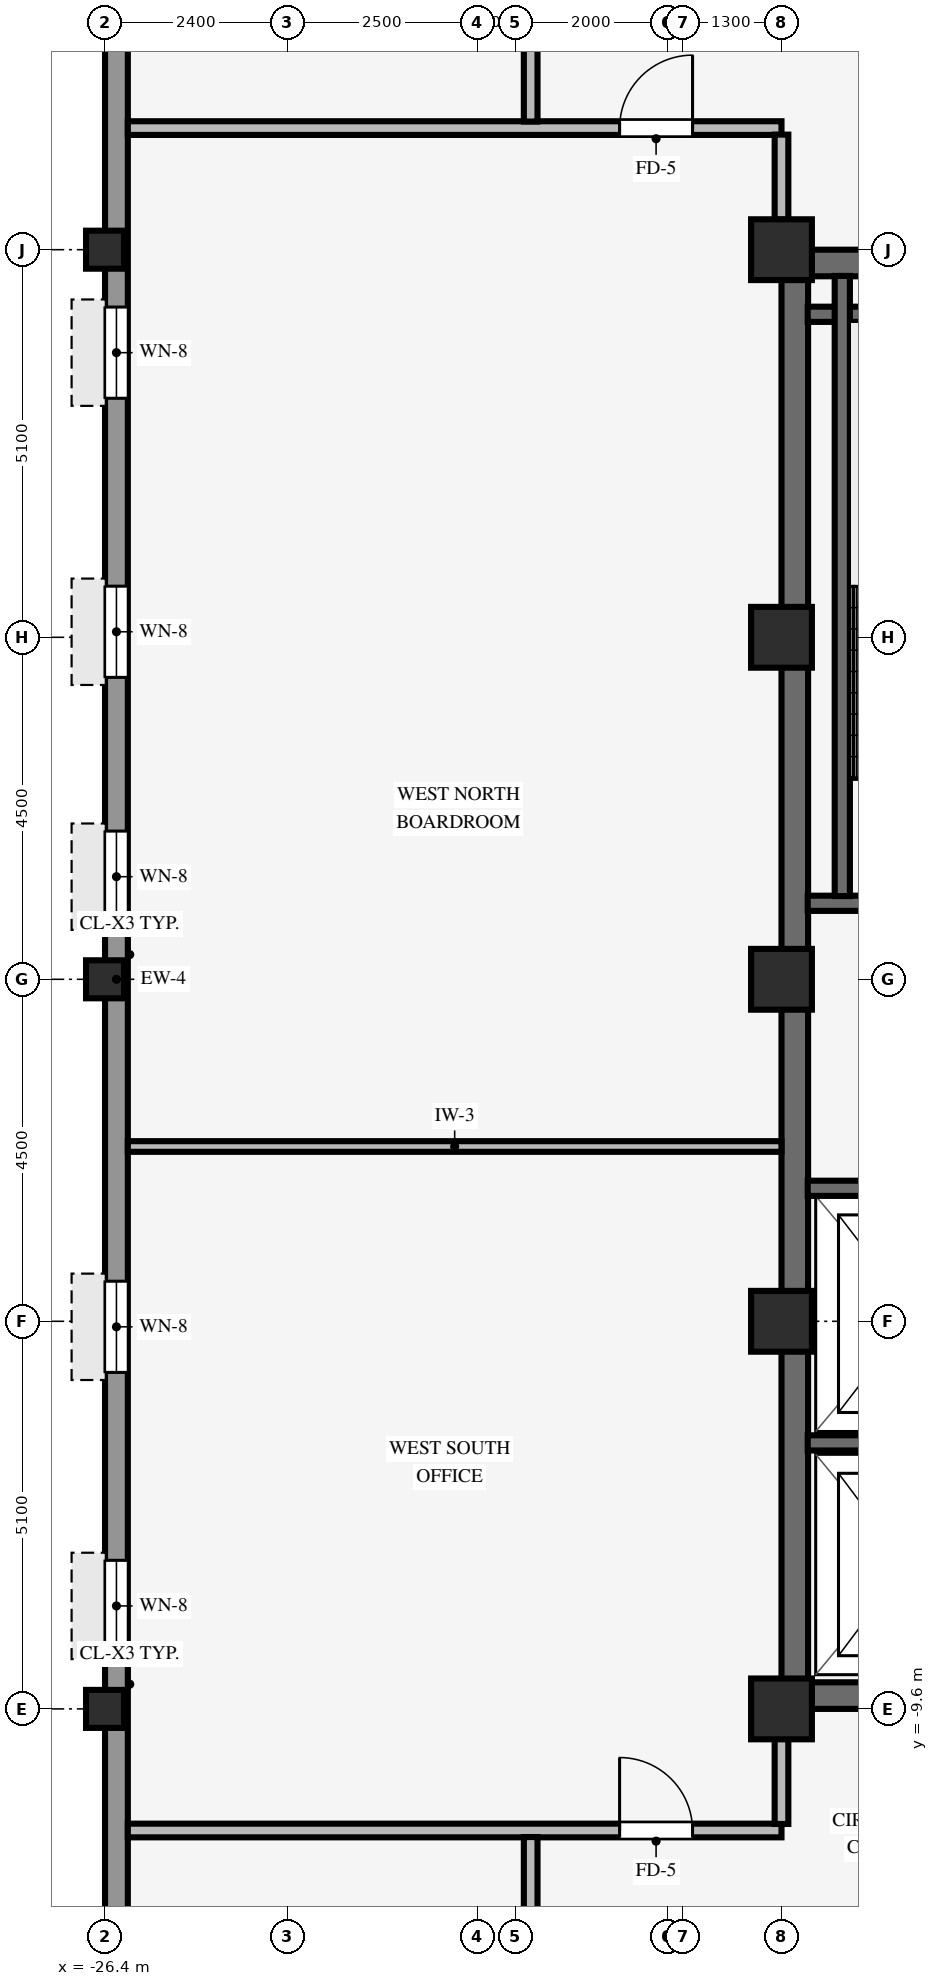
"""IFC4 building model, lengths in metres.
Left out: names, types, materials, properties, quantities, classifications, styles, units other than length and angle.
Written with IfcOpenShell. Run it as: python <this file> out.ifc"""

import sys

from ifc_helpers import new_model, si_unit, direction, frame, frame_2d, origin, origin_2d, place, context, subcontext, project, spatial, rectangle, hollow_rectangle, extrude, source, transform, mapped, element, fill, save


model = new_model("IFC4")
c1 = context("Model", 3, precision=1e-05, world=origin(), true_north=direction((0.0, 1.0)))
c2 = subcontext(c1, "Body", "Model", "MODEL_VIEW")
j1 = project(units=[si_unit("LENGTHUNIT", "METRE"), si_unit("PLANEANGLEUNIT", "RADIAN")], contexts=[c1])
p1 = place(None, origin())
s1 = spatial("IfcSite", under=j1, at=p1, CompositionType="ELEMENT")
p2 = place(p1, origin())
s2 = spatial("IfcBuilding", under=s1, at=p2, CompositionType="ELEMENT")
p3 = place(p2, frame((0.0, 0.0, 234.7)))
s3 = spatial("IfcBuildingStorey", under=s2, at=p3, CompositionType="ELEMENT", Elevation=234.7)
for number, where, z_axis, x_axis in (
    (1, (-17.5, -9.425, 0.0), (0.0, 0.0, 1.0), (1.0, 0.0, 0.0)),
    (2, (-17.5, 9.425, 0.0), (0.0, 0.0, 1.0), (1.0, 0.0, 0.0)),
):
    element("IfcWall", number, at=place(p3, frame(where, z_axis=z_axis, x_axis=x_axis)), inside=s3, PredefinedType="SHEAR", context=c2, shape_type="SweptSolid", body=[
        extrude(rectangle(XDim=8.5, YDim=0.35, at=frame_2d((4.25, 0.0))), origin(), (0.0, 0.0, 1.0), 3.37),
    ])
p4 = place(p3, frame((-17.325, -9.255, 0.0), z_axis=(0.0, 0.0, 1.0), x_axis=(0.0, 1.0, 0.0)))
e3 = element("IfcWall", 3, at=p4, inside=s3, PredefinedType="SHEAR", context=c2, shape_type="SweptSolid", body=[
    extrude(rectangle(XDim=18.51, YDim=0.35, at=frame_2d((9.255, 0.0))), origin(), (0.0, 0.0, 1.0), 3.37),
])
for number, where, z_axis, x_axis in (
    (4, (-17.5, -9.6, 0.0), (0.0, 0.0, 1.0), (1.0, 0.0, 0.0)),
    (5, (-17.5, -4.5, 0.0), (0.0, 0.0, 1.0), (1.0, 0.0, 0.0)),
    (6, (-17.5, 4.5, 0.0), (0.0, 0.0, 1.0), (1.0, 0.0, 0.0)),
    (7, (-17.5, 9.6, 0.0), (0.0, 0.0, 1.0), (1.0, 0.0, 0.0)),
    (8, (-17.5, 0.0, 0.0), (0.0, 0.0, 1.0), (1.0, 0.0, 0.0)),
):
    element("IfcColumn", number, at=place(p3, frame(where, z_axis=z_axis, x_axis=x_axis)), inside=s3, PredefinedType="COLUMN", context=c2, shape_type="SweptSolid", body=[
        extrude(rectangle(XDim=0.8, YDim=0.8, at=origin_2d()), origin(), (0.0, 0.0, 1.0), 3.37),
    ])
for number, where, z_axis, x_axis in (
    (9, (-26.4, -9.6, 0.0), (0.0, 0.0, 1.0), (1.0, 0.0, 0.0)),
    (10, (-26.4, 0.0, 0.0), (0.0, 0.0, 1.0), (1.0, 0.0, 0.0)),
    (11, (-26.4, 9.6, 0.0), (0.0, 0.0, 1.0), (1.0, 0.0, 0.0)),
):
    element("IfcColumn", number, at=place(p3, frame(where, z_axis=z_axis, x_axis=x_axis)), inside=s3, PredefinedType="COLUMN", context=c2, shape_type="SweptSolid", body=[
        extrude(hollow_rectangle(XDim=0.5, YDim=0.5, WallThickness=0.032, InnerFilletRadius=0.032, OuterFilletRadius=0.064, at=origin_2d()), origin(), (0.0, 0.0, 1.0), 3.37),
    ])
p5 = place(p3, frame((-26.25, -17.004, 0.0), z_axis=(0.0, 0.0, 1.0), x_axis=(0.0, 1.0, 0.0)))
e12 = element("IfcWall", 12, at=p5, inside=s3, PredefinedType="STANDARD", context=c2, shape_type="SweptSolid", body=[
    extrude(rectangle(XDim=34.008, YDim=0.3, at=frame_2d((17.004, 0.0))), origin(), (0.0, 0.0, 1.0), 2.705),
])
p6 = place(p5, frame((2.686, 0.0, 0.8)))
e13 = element("IfcOpeningElement", 13, at=p6, cuts=e12, PredefinedType="OPENING", context=c2, shape_type="SweptSolid", body=[
    extrude(rectangle(XDim=1.2, YDim=1.48, at=frame_2d((0.6, 0.74))), frame((0.0, 0.16, 0.0), z_axis=(0.0, -1.0, 0.0), x_axis=(1.0, 0.0, 0.0)), (0.0, 0.0, 1.0), 0.32),
])
p7 = place(p5, frame((8.159, 0.0, 0.8)))
e14 = element("IfcOpeningElement", 14, at=p7, cuts=e12, PredefinedType="OPENING", context=c2, shape_type="SweptSolid", body=[
    extrude(rectangle(XDim=1.2, YDim=1.48, at=frame_2d((0.6, 0.74))), frame((0.0, 0.16, 0.0), z_axis=(0.0, -1.0, 0.0), x_axis=(1.0, 0.0, 0.0)), (0.0, 0.0, 1.0), 0.32),
])
p8 = place(p5, frame((11.831, 0.0, 0.8)))
e15 = element("IfcOpeningElement", 15, at=p8, cuts=e12, PredefinedType="OPENING", context=c2, shape_type="SweptSolid", body=[
    extrude(rectangle(XDim=1.2, YDim=1.48, at=frame_2d((0.6, 0.74))), frame((0.0, 0.16, 0.0), z_axis=(0.0, -1.0, 0.0), x_axis=(1.0, 0.0, 0.0)), (0.0, 0.0, 1.0), 0.32),
])
p9 = place(p5, frame((17.754, 0.0, 0.8)))
e16 = element("IfcOpeningElement", 16, at=p9, cuts=e12, PredefinedType="OPENING", context=c2, shape_type="SweptSolid", body=[
    extrude(rectangle(XDim=1.2, YDim=1.48, at=frame_2d((0.6, 0.74))), frame((0.0, 0.16, 0.0), z_axis=(0.0, -1.0, 0.0), x_axis=(1.0, 0.0, 0.0)), (0.0, 0.0, 1.0), 0.32),
])
p10 = place(p5, frame((20.977, 0.0, 0.8)))
e17 = element("IfcOpeningElement", 17, at=p10, cuts=e12, PredefinedType="OPENING", context=c2, shape_type="SweptSolid", body=[
    extrude(rectangle(XDim=1.2, YDim=1.48, at=frame_2d((0.6, 0.74))), frame((0.0, 0.16, 0.0), z_axis=(0.0, -1.0, 0.0), x_axis=(1.0, 0.0, 0.0)), (0.0, 0.0, 1.0), 0.32),
])
p11 = place(p5, frame((24.649, 0.0, 0.8)))
e18 = element("IfcOpeningElement", 18, at=p11, cuts=e12, PredefinedType="OPENING", context=c2, shape_type="SweptSolid", body=[
    extrude(rectangle(XDim=1.2, YDim=1.48, at=frame_2d((0.6, 0.74))), frame((0.0, 0.16, 0.0), z_axis=(0.0, -1.0, 0.0), x_axis=(1.0, 0.0, 0.0)), (0.0, 0.0, 1.0), 0.32),
])
p12 = place(p5, frame((30.122, 0.0, 0.8)))
e19 = element("IfcOpeningElement", 19, at=p12, cuts=e12, PredefinedType="OPENING", context=c2, shape_type="SweptSolid", body=[
    extrude(rectangle(XDim=1.2, YDim=1.48, at=frame_2d((0.6, 0.74))), frame((0.0, 0.16, 0.0), z_axis=(0.0, -1.0, 0.0), x_axis=(1.0, 0.0, 0.0)), (0.0, 0.0, 1.0), 0.32),
])
for number, where, z_axis, x_axis in (
    (20, (-17.155, 1.0, 0.0), (0.0, 0.0, 1.0), (1.0, 0.0, 0.0)),
    (21, (-17.155, 8.75, 0.0), (0.0, 0.0, 1.0), (1.0, 0.0, 0.0)),
):
    element("IfcWall", number, at=place(p3, frame(where, z_axis=z_axis, x_axis=x_axis)), inside=s3, PredefinedType="SHEAR", context=c2, shape_type="SweptSolid", body=[
        extrude(rectangle(XDim=3.62, YDim=0.2, at=frame_2d((1.81, 0.0))), origin(), (0.0, 0.0, 1.0), 3.37),
    ])
p13 = place(p3, frame((-16.7, 1.095, 0.0), z_axis=(0.0, 0.0, 1.0), x_axis=(0.0, 1.0, 0.0)))
e22 = element("IfcWall", 22, at=p13, inside=s3, PredefinedType="SHEAR", context=c2, shape_type="SweptSolid", body=[
    extrude(rectangle(XDim=8.16, YDim=0.2, at=frame_2d((4.08, 0.0))), origin(), (0.0, 0.0, 1.0), 3.37),
])
p14 = place(p3, frame((-17.155, -6.1, 0.0), z_axis=(0.0, 0.0, 1.0), x_axis=(1.0, 0.0, 0.0)))
e23 = element("IfcWall", 23, at=p14, inside=s3, PredefinedType="SHEAR", context=c2, shape_type="SweptSolid", body=[
    extrude(rectangle(XDim=2.905, YDim=0.2, at=frame_2d((1.453, 0.0))), origin(), (0.0, 0.0, 1.0), 3.37),
])
p15 = place(p3, frame((-17.155, -2.75, 0.0), z_axis=(0.0, 0.0, 1.0), x_axis=(1.0, 0.0, 0.0)))
e24 = element("IfcWall", 24, at=p15, inside=s3, PredefinedType="SHEAR", context=c2, shape_type="SweptSolid", body=[
    extrude(rectangle(XDim=2.71, YDim=0.2, at=frame_2d((1.355, 0.0))), origin(), (0.0, 0.0, 1.0), 3.37),
])
p16 = place(p3, frame((-26.1, -11.2, 0.0), z_axis=(0.0, 0.0, 1.0), x_axis=(1.0, 0.0, 0.0)))
e25 = element("IfcWall", 25, at=p16, inside=s3, PredefinedType="PARTITIONING", context=c2, shape_type="SweptSolid", body=[
    extrude(rectangle(XDim=8.6, YDim=0.18, at=frame_2d((4.3, 0.0))), origin(), (0.0, 0.0, 1.0), 3.36),
])
p17 = place(p16, frame((6.47, 0.0, 0.0)))
e26 = element("IfcOpeningElement", 26, at=p17, cuts=e25, PredefinedType="OPENING", context=c2, shape_type="SweptSolid", body=[
    extrude(rectangle(XDim=0.96, YDim=2.1, at=frame_2d((0.48, 1.05))), frame((0.0, 0.1, 0.0), z_axis=(0.0, -1.0, 0.0), x_axis=(1.0, 0.0, 0.0)), (0.0, 0.0, 1.0), 0.2),
])
p18 = place(p3, frame((-26.1, -2.2, 0.0), z_axis=(0.0, 0.0, 1.0), x_axis=(1.0, 0.0, 0.0)))
e27 = element("IfcWall", 27, at=p18, inside=s3, PredefinedType="PARTITIONING", context=c2, shape_type="SweptSolid", body=[
    extrude(rectangle(XDim=8.6, YDim=0.14, at=frame_2d((4.3, 0.0))), origin(), (0.0, 0.0, 1.0), 3.36),
])
p19 = place(p3, frame((-26.1, 11.2, 0.0), z_axis=(0.0, 0.0, 1.0), x_axis=(1.0, 0.0, 0.0)))
e28 = element("IfcWall", 28, at=p19, inside=s3, PredefinedType="PARTITIONING", context=c2, shape_type="SweptSolid", body=[
    extrude(rectangle(XDim=8.6, YDim=0.18, at=frame_2d((4.3, 0.0))), origin(), (0.0, 0.0, 1.0), 3.36),
])
p20 = place(p19, frame((6.47, 0.0, 0.0)))
e29 = element("IfcOpeningElement", 29, at=p20, cuts=e28, PredefinedType="OPENING", context=c2, shape_type="SweptSolid", body=[
    extrude(rectangle(XDim=0.96, YDim=2.1, at=frame_2d((0.48, 1.05))), frame((0.0, 0.1, 0.0), z_axis=(0.0, -1.0, 0.0), x_axis=(1.0, 0.0, 0.0)), (0.0, 0.0, 1.0), 0.2),
])
for number, where, z_axis, x_axis in (
    (30, (-20.8, -13.514, 0.0), (0.0, 0.0, 1.0), (0.0, 1.0, 0.0)),
    (31, (-20.8, 11.286, 0.0), (0.0, 0.0, 1.0), (0.0, 1.0, 0.0)),
):
    element("IfcWall", number, at=place(p3, frame(where, z_axis=z_axis, x_axis=x_axis)), inside=s3, PredefinedType="PARTITIONING", context=c2, shape_type="SweptSolid", body=[
        extrude(rectangle(XDim=2.228, YDim=0.18, at=frame_2d((1.114, 0.0))), origin(), (0.0, 0.0, 1.0), 3.36),
    ])
for number, where, z_axis, x_axis in (
    (32, (-17.5, -11.114, 0.0), (0.0, 0.0, 1.0), (0.0, 1.0, 0.0)),
    (33, (-17.5, 9.996, 0.0), (0.0, 0.0, 1.0), (0.0, 1.0, 0.0)),
):
    element("IfcWall", number, at=place(p3, frame(where, z_axis=z_axis, x_axis=x_axis)), inside=s3, PredefinedType="PARTITIONING", context=c2, shape_type="SweptSolid", body=[
        extrude(rectangle(XDim=1.118, YDim=0.18, at=frame_2d((0.559, 0.0))), origin(), (0.0, 0.0, 1.0), 2.892),
    ])
m1 = source(origin(), c2, "Body", "SweptSolid", [
    extrude(rectangle(XDim=1.2, YDim=1.48, at=frame_2d((0.6, 0.74))), frame((0.0, 0.03, 0.0), z_axis=(0.0, -1.0, 0.0), x_axis=(1.0, 0.0, 0.0)), (0.0, 0.0, 1.0), 0.06),
])
p21 = place(p7, origin())
e34 = element("IfcWindow", 34, at=p21, inside=s3, PartitioningType="SINGLE_PANEL", PredefinedType="WINDOW", context=c2, shape_type="MappedRepresentation", body=[
    mapped(m1, transform((0.0, 0.0, 0.0), scale=1.0)),
])
fill(e14, e34)
p22 = place(p8, origin())
e35 = element("IfcWindow", 35, at=p22, inside=s3, PartitioningType="SINGLE_PANEL", PredefinedType="WINDOW", context=c2, shape_type="MappedRepresentation", body=[
    mapped(m1, transform((0.0, 0.0, 0.0), scale=1.0)),
])
fill(e15, e35)
p23 = place(p9, origin())
e36 = element("IfcWindow", 36, at=p23, inside=s3, PartitioningType="SINGLE_PANEL", PredefinedType="WINDOW", context=c2, shape_type="MappedRepresentation", body=[
    mapped(m1, transform((0.0, 0.0, 0.0), scale=1.0)),
])
fill(e16, e36)
p24 = place(p10, origin())
e37 = element("IfcWindow", 37, at=p24, inside=s3, PartitioningType="SINGLE_PANEL", PredefinedType="WINDOW", context=c2, shape_type="MappedRepresentation", body=[
    mapped(m1, transform((0.0, 0.0, 0.0), scale=1.0)),
])
fill(e17, e37)
p25 = place(p11, origin())
e38 = element("IfcWindow", 38, at=p25, inside=s3, PartitioningType="SINGLE_PANEL", PredefinedType="WINDOW", context=c2, shape_type="MappedRepresentation", body=[
    mapped(m1, transform((0.0, 0.0, 0.0), scale=1.0)),
])
fill(e18, e38)
m2 = source(origin(), c2, "Body", "SweptSolid", [
    extrude(rectangle(XDim=0.96, YDim=2.1, at=frame_2d((0.48, 1.05))), frame((0.0, 0.025, 0.0), z_axis=(0.0, -1.0, 0.0), x_axis=(1.0, 0.0, 0.0)), (0.0, 0.0, 1.0), 0.05),
])
p26 = place(p17, origin())
e39 = element("IfcDoor", 39, at=p26, inside=s3, OperationType="SINGLE_SWING_LEFT", PredefinedType="DOOR", context=c2, shape_type="MappedRepresentation", body=[
    mapped(m2, transform((0.0, 0.0, 0.0), scale=1.0)),
])
fill(e26, e39)
p27 = place(p20, origin())
e40 = element("IfcDoor", 40, at=p27, inside=s3, OperationType="SINGLE_SWING_RIGHT", PredefinedType="DOOR", context=c2, shape_type="MappedRepresentation", body=[
    mapped(m2, transform((0.0, 0.0, 0.0), scale=1.0)),
])
fill(e29, e40)
save(model, sys.argv[1])
